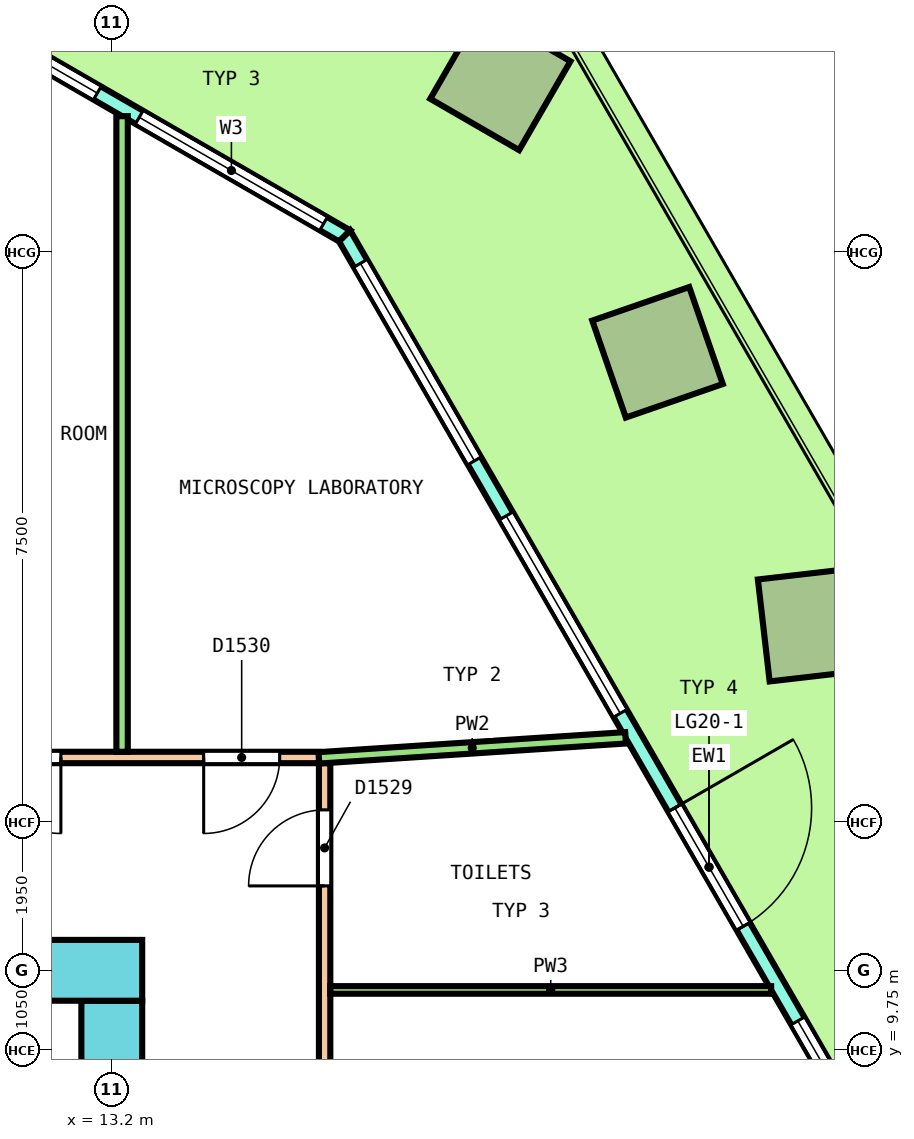
"""IFC4 building model, lengths in metres.
Left out: names, types, materials, properties, quantities, classifications, styles, units other than length and angle.
Written with IfcOpenShell. Run it as: python <this file> out.ifc"""

import sys

from ifc_helpers import new_model, si_unit, direction, frame, frame_2d, origin, origin_2d, place, context, subcontext, project, spatial, polyline, rectangle, outline, extrude, element, fill, save


model = new_model("IFC4")
c1 = context("Model", 3, precision=1e-05, world=origin(), true_north=direction((0.0, 1.0)))
c2 = subcontext(c1, "Body", "Model", "MODEL_VIEW")
j1 = project(units=[si_unit("LENGTHUNIT", "METRE"), si_unit("PLANEANGLEUNIT", "RADIAN")], contexts=[c1])
p1 = place(None, origin())
s1 = spatial("IfcSite", under=j1, at=p1, CompositionType="ELEMENT")
p2 = place(p1, origin())
s2 = spatial("IfcBuilding", under=s1, at=p2, CompositionType="ELEMENT")
p3 = place(p2, frame((0.0, 0.0, 94.0)))
s3 = spatial("IfcBuildingStorey", under=s2, at=p3, CompositionType="ELEMENT", Elevation=94.0)
p4 = place(p3, frame((22.448, 15.348, 0.0), z_axis=(0.029040838643, 0.012592396839, 0.999498905068), x_axis=(-0.500309041058, 0.865839303482, 0.003628220107)))
e1 = element("IfcColumn", 1, at=p4, inside=s3, PredefinedType="COLUMN", context=c2, shape_type="SweptSolid", body=[
    extrude(rectangle(XDim=1.35, YDim=1.35, at=origin_2d()), origin(), (0.0, 0.0, 1.0), 4.052),
])
p5 = place(p3, frame((20.38, 18.93, 0.0), z_axis=(0.032654187208, 0.006265748099, 0.999447069363), x_axis=(-0.498938011444, 0.86656951925, 0.010868718561)))
e2 = element("IfcColumn", 2, at=p5, inside=s3, PredefinedType="COLUMN", context=c2, shape_type="SweptSolid", body=[
    extrude(rectangle(XDim=1.35, YDim=1.35, at=origin_2d()), origin(), (0.0, 0.0, 1.0), 4.052),
])
p6 = place(p3, frame((18.312, 22.512, 0.0), z_axis=(0.036265236264, 0.0, 0.999342199969), x_axis=(-0.865313546461, 0.500246354177, 0.031401456084)))
e3 = element("IfcColumn", 3, at=p6, inside=s3, PredefinedType="COLUMN", context=c2, shape_type="SweptSolid", body=[
    extrude(rectangle(XDim=1.35, YDim=1.35, at=origin_2d()), origin(), (0.0, 0.0, 1.0), 4.053),
])
p7 = place(p3, frame((25.852, 3.852, 0.0), z_axis=(0.0, 0.0, 1.0), x_axis=(-0.499998279088, 0.866026397351, 0.0)))
e4 = element("IfcWall", 4, at=p7, inside=s3, PredefinedType="SOLIDWALL", context=c2, shape_type="SweptSolid", body=[
    extrude(outline(polyline([(-0.027, -0.1), (0.985, -0.1), (1.998, -0.1), (3.01, -0.1), (4.022, -0.1), (5.035, -0.1), (6.047, -0.1), (7.059, -0.1), (8.072, -0.1), (9.084, -0.1), (10.096, -0.1), (11.109, -0.1), (12.121, -0.1), (13.133, -0.1), (14.146, -0.1), (15.158, -0.1), (16.17, -0.1), (17.182, -0.1), (18.195, -0.1), (19.207, -0.1), (19.153, 0.1), (18.147, 0.1), (17.14, 0.1), (16.133, 0.1), (15.127, 0.1), (14.12, 0.1), (13.113, 0.1), (12.107, 0.1), (11.1, 0.1), (10.094, 0.1), (9.087, 0.1), (8.08, 0.1), (7.073, 0.1), (6.067, 0.1), (5.06, 0.1), (4.053, 0.1), (3.047, 0.1), (2.04, 0.1), (1.033, 0.1), (0.027, 0.1), (-0.027, -0.1)])), origin(), (0.0, 0.0, 1.0), 4.1),
])
p8 = place(p7, frame((0.418, 0.0, 0.1)))
e5 = element("IfcOpeningElement", 5, at=p8, cuts=e4, PredefinedType="OPENING", context=c2, shape_type="SweptSolid", body=[
    extrude(rectangle(XDim=3.0, YDim=2.9, at=frame_2d((1.5, 1.45))), frame((0.0, 0.11, 0.0), z_axis=(0.0, -1.0, 0.0), x_axis=(1.0, 0.0, 0.0)), (0.0, 0.0, 1.0), 0.22),
])
p9 = place(p7, frame((4.254, 0.0, 0.1)))
e6 = element("IfcOpeningElement", 6, at=p9, cuts=e4, PredefinedType="OPENING", context=c2, shape_type="SweptSolid", body=[
    extrude(rectangle(XDim=3.0, YDim=2.9, at=frame_2d((1.5, 1.45))), frame((0.0, 0.11, 0.0), z_axis=(0.0, -1.0, 0.0), x_axis=(1.0, 0.0, 0.0)), (0.0, 0.0, 1.0), 0.22),
])
p10 = place(p7, frame((8.69, 0.0, 0.0)))
e7 = element("IfcOpeningElement", 7, at=p10, cuts=e4, PredefinedType="OPENING", context=c2, shape_type="SweptSolid", body=[
    extrude(rectangle(XDim=1.8, YDim=2.4, at=frame_2d((0.9, 1.2))), frame((0.0, 0.11, 0.0), z_axis=(0.0, -1.0, 0.0), x_axis=(1.0, 0.0, 0.0)), (0.0, 0.0, 1.0), 0.22),
])
p11 = place(p7, frame((8.69, 0.0, 2.55)))
e8 = element("IfcOpeningElement", 8, at=p11, cuts=e4, PredefinedType="OPENING", context=c2, shape_type="SweptSolid", body=[
    extrude(rectangle(XDim=1.8, YDim=0.45, at=frame_2d((0.9, 0.225))), frame((0.0, 0.11, 0.0), z_axis=(0.0, -1.0, 0.0), x_axis=(1.0, 0.0, 0.0)), (0.0, 0.0, 1.0), 0.22),
])
p12 = place(p7, frame((11.926, 0.0, 0.1)))
e9 = element("IfcOpeningElement", 9, at=p12, cuts=e4, PredefinedType="OPENING", context=c2, shape_type="SweptSolid", body=[
    extrude(rectangle(XDim=3.0, YDim=2.9, at=frame_2d((1.5, 1.45))), frame((0.0, 0.11, 0.0), z_axis=(0.0, -1.0, 0.0), x_axis=(1.0, 0.0, 0.0)), (0.0, 0.0, 1.0), 0.22),
])
p13 = place(p7, frame((15.762, 0.0, 0.1)))
e10 = element("IfcOpeningElement", 10, at=p13, cuts=e4, PredefinedType="OPENING", context=c2, shape_type="SweptSolid", body=[
    extrude(rectangle(XDim=3.0, YDim=2.9, at=frame_2d((1.5, 1.45))), frame((0.0, 0.11, 0.0), z_axis=(0.0, -1.0, 0.0), x_axis=(1.0, 0.0, 0.0)), (0.0, 0.0, 1.0), 0.22),
])
p14 = place(p3, frame((16.262, 20.463, 0.0), z_axis=(0.0, 0.0, 1.0), x_axis=(-0.866029458321, 0.49999297727, 0.0)))
e11 = element("IfcWall", 11, at=p14, inside=s3, PredefinedType="SOLIDWALL", context=c2, shape_type="SweptSolid", body=[
    extrude(outline(polyline([(-0.027, -0.1), (1.128, -0.1), (2.282, -0.1), (3.437, -0.1), (4.592, -0.1), (5.747, -0.1), (6.901, -0.1), (6.848, 0.1), (5.711, 0.1), (4.574, 0.1), (3.437, 0.1), (2.301, 0.1), (1.164, 0.1), (0.027, 0.1), (-0.027, -0.1)])), origin(), (0.0, 0.0, 1.0), 4.1),
])
p15 = place(p14, frame((0.319, 0.0, 0.1)))
e12 = element("IfcOpeningElement", 12, at=p15, cuts=e11, PredefinedType="OPENING", context=c2, shape_type="SweptSolid", body=[
    extrude(rectangle(XDim=2.8, YDim=2.9, at=frame_2d((1.4, 1.45))), frame((0.0, 0.11, 0.0), z_axis=(0.0, -1.0, 0.0), x_axis=(1.0, 0.0, 0.0)), (0.0, 0.0, 1.0), 0.22),
])
p16 = place(p14, frame((3.756, 0.0, 0.1)))
e13 = element("IfcOpeningElement", 13, at=p16, cuts=e11, PredefinedType="OPENING", context=c2, shape_type="SweptSolid", body=[
    extrude(rectangle(XDim=2.8, YDim=2.9, at=frame_2d((1.4, 1.45))), frame((0.0, 0.11, 0.0), z_axis=(0.0, -1.0, 0.0), x_axis=(1.0, 0.0, 0.0)), (0.0, 0.0, 1.0), 0.22),
])
p17 = place(p3, frame((-13.6, 10.8, 0.0), z_axis=(0.0, 0.0, 1.0), x_axis=(1.0, 0.0, 0.0)))
e14 = element("IfcWall", 14, at=p17, inside=s3, PredefinedType="SHEAR", context=c2, shape_type="SweptSolid", body=[
    extrude(rectangle(XDim=27.2, YDim=0.8, at=frame_2d((13.6, 0.0))), origin(), (0.0, 0.0, 1.0), 4.1),
])
p18 = place(p17, frame((1.798, 0.0, 0.0)))
e15 = element("IfcOpeningElement", 15, at=p18, cuts=e14, PredefinedType="OPENING", context=c2, shape_type="SweptSolid", body=[
    extrude(rectangle(XDim=1.0, YDim=2.1, at=frame_2d((0.5, 1.05))), frame((0.0, 0.41, 0.0), z_axis=(0.0, -1.0, 0.0), x_axis=(1.0, 0.0, 0.0)), (0.0, 0.0, 1.0), 0.82),
])
p19 = place(p17, frame((4.889, 0.0, 0.0)))
e16 = element("IfcOpeningElement", 16, at=p19, cuts=e14, PredefinedType="OPENING", context=c2, shape_type="SweptSolid", body=[
    extrude(rectangle(XDim=1.0, YDim=2.1, at=frame_2d((0.5, 1.05))), frame((0.0, 0.41, 0.0), z_axis=(0.0, -1.0, 0.0), x_axis=(1.0, 0.0, 0.0)), (0.0, 0.0, 1.0), 0.82),
])
p20 = place(p17, frame((7.948, 0.0, 0.0)))
e17 = element("IfcOpeningElement", 17, at=p20, cuts=e14, PredefinedType="OPENING", context=c2, shape_type="SweptSolid", body=[
    extrude(rectangle(XDim=1.0, YDim=2.1, at=frame_2d((0.5, 1.05))), frame((0.0, 0.41, 0.0), z_axis=(0.0, -1.0, 0.0), x_axis=(1.0, 0.0, 0.0)), (0.0, 0.0, 1.0), 0.82),
])
p21 = place(p17, frame((11.008, 0.0, 0.0)))
e18 = element("IfcOpeningElement", 18, at=p21, cuts=e14, PredefinedType="OPENING", context=c2, shape_type="SweptSolid", body=[
    extrude(rectangle(XDim=1.0, YDim=2.1, at=frame_2d((0.5, 1.05))), frame((0.0, 0.41, 0.0), z_axis=(0.0, -1.0, 0.0), x_axis=(1.0, 0.0, 0.0)), (0.0, 0.0, 1.0), 0.82),
])
p22 = place(p17, frame((18.035, 0.0, 0.0)))
e19 = element("IfcOpeningElement", 19, at=p22, cuts=e14, PredefinedType="OPENING", context=c2, shape_type="SweptSolid", body=[
    extrude(rectangle(XDim=1.0, YDim=2.1, at=frame_2d((0.5, 1.05))), frame((0.0, 0.41, 0.0), z_axis=(0.0, -1.0, 0.0), x_axis=(1.0, 0.0, 0.0)), (0.0, 0.0, 1.0), 0.82),
])
p23 = place(p17, frame((21.181, 0.0, 0.0)))
e20 = element("IfcOpeningElement", 20, at=p23, cuts=e14, PredefinedType="OPENING", context=c2, shape_type="SweptSolid", body=[
    extrude(rectangle(XDim=1.0, YDim=2.1, at=frame_2d((0.5, 1.05))), frame((0.0, 0.41, 0.0), z_axis=(0.0, -1.0, 0.0), x_axis=(1.0, 0.0, 0.0)), (0.0, 0.0, 1.0), 0.82),
])
p24 = place(p17, frame((24.358, 0.0, 0.0)))
e21 = element("IfcOpeningElement", 21, at=p24, cuts=e14, PredefinedType="OPENING", context=c2, shape_type="SweptSolid", body=[
    extrude(rectangle(XDim=1.0, YDim=2.1, at=frame_2d((0.5, 1.05))), frame((0.0, 0.41, 0.0), z_axis=(0.0, -1.0, 0.0), x_axis=(1.0, 0.0, 0.0)), (0.0, 0.0, 1.0), 0.82),
])
p25 = place(p17, frame((14.525, 0.0, 0.0)))
e22 = element("IfcOpeningElement", 22, at=p25, cuts=e14, PredefinedType="OPENING", context=c2, shape_type="SweptSolid", body=[
    extrude(rectangle(XDim=1.4, YDim=2.1, at=frame_2d((0.7, 1.05))), frame((0.0, 0.41, 0.0), z_axis=(0.0, -1.0, 0.0), x_axis=(1.0, 0.0, 0.0)), (0.0, 0.0, 1.0), 0.82),
])
p26 = place(p3, frame((13.2, -10.4, 0.0), z_axis=(0.0, 0.0, 1.0), x_axis=(0.0, 1.0, 0.0)))
e23 = element("IfcWall", 23, at=p26, inside=s3, PredefinedType="SHEAR", context=c2, shape_type="SweptSolid", body=[
    extrude(rectangle(XDim=20.8, YDim=0.8, at=frame_2d((10.4, 0.0))), origin(), (0.0, 0.0, 1.0), 4.1),
])
p27 = place(p26, frame((9.2, 0.0, 0.0)))
e24 = element("IfcOpeningElement", 24, at=p27, cuts=e23, PredefinedType="OPENING", context=c2, shape_type="SweptSolid", body=[
    extrude(rectangle(XDim=2.4, YDim=2.1, at=frame_2d((1.2, 1.05))), frame((0.0, 0.41, 0.0), z_axis=(0.0, -1.0, 0.0), x_axis=(1.0, 0.0, 0.0)), (0.0, 0.0, 1.0), 0.82),
])
p28 = place(p26, frame((16.1, 0.0, 0.0)))
e25 = element("IfcOpeningElement", 25, at=p28, cuts=e23, PredefinedType="OPENING", context=c2, shape_type="SweptSolid", body=[
    extrude(rectangle(XDim=1.2, YDim=2.1, at=frame_2d((0.6, 1.05))), frame((0.0, 0.41, 0.0), z_axis=(0.0, -1.0, 0.0), x_axis=(1.0, 0.0, 0.0)), (0.0, 0.0, 1.0), 0.82),
])
p29 = place(p26, frame((3.6, 0.0, 0.0)))
e26 = element("IfcOpeningElement", 26, at=p29, cuts=e23, PredefinedType="OPENING", context=c2, shape_type="SweptSolid", body=[
    extrude(rectangle(XDim=1.0, YDim=2.1, at=frame_2d((0.5, 1.05))), frame((0.0, 0.41, 0.0), z_axis=(0.0, -1.0, 0.0), x_axis=(1.0, 0.0, 0.0)), (0.0, 0.0, 1.0), 0.82),
])
p30 = place(p3, frame((16.0, -13.525, 0.0), z_axis=(0.0, 0.0, 1.0), x_axis=(0.0, 1.0, 0.0)))
e27 = element("IfcWall", 27, at=p30, inside=s3, PredefinedType="PARTITIONING", context=c2, shape_type="SweptSolid", body=[
    extrude(rectangle(XDim=27.05, YDim=0.15, at=frame_2d((13.525, 0.0))), origin(), (0.0, 0.0, 1.0), 3.05),
])
p31 = place(p30, frame((18.403, 0.0, 0.0)))
e28 = element("IfcOpeningElement", 28, at=p31, cuts=e27, PredefinedType="OPENING", context=c2, shape_type="SweptSolid", body=[
    extrude(rectangle(XDim=1.2, YDim=2.1, at=frame_2d((0.6, 1.05))), frame((0.0, 0.085, 0.0), z_axis=(0.0, -1.0, 0.0), x_axis=(1.0, 0.0, 0.0)), (0.0, 0.0, 1.0), 0.17),
])
p32 = place(p30, frame((25.435, 0.0, 0.0)))
e29 = element("IfcOpeningElement", 29, at=p32, cuts=e27, PredefinedType="OPENING", context=c2, shape_type="SweptSolid", body=[
    extrude(rectangle(XDim=1.0, YDim=2.1, at=frame_2d((0.5, 1.05))), frame((0.0, 0.085, 0.0), z_axis=(0.0, -1.0, 0.0), x_axis=(1.0, 0.0, 0.0)), (0.0, 0.0, 1.0), 0.17),
])
p33 = place(p30, frame((1.542, 0.0, 0.0)))
e30 = element("IfcOpeningElement", 30, at=p33, cuts=e27, PredefinedType="OPENING", context=c2, shape_type="SweptSolid", body=[
    extrude(rectangle(XDim=1.0, YDim=2.1, at=frame_2d((0.5, 1.05))), frame((0.0, 0.085, 0.0), z_axis=(0.0, -1.0, 0.0), x_axis=(1.0, 0.0, 0.0)), (0.0, 0.0, 1.0), 0.17),
])
p34 = place(p30, frame((4.605, 0.0, 0.0)))
e31 = element("IfcOpeningElement", 31, at=p34, cuts=e27, PredefinedType="OPENING", context=c2, shape_type="SweptSolid", body=[
    extrude(rectangle(XDim=1.0, YDim=2.1, at=frame_2d((0.5, 1.05))), frame((0.0, 0.085, 0.0), z_axis=(0.0, -1.0, 0.0), x_axis=(1.0, 0.0, 0.0)), (0.0, 0.0, 1.0), 0.17),
])
p35 = place(p30, frame((7.904, 0.0, 0.0)))
e32 = element("IfcOpeningElement", 32, at=p35, cuts=e27, PredefinedType="OPENING", context=c2, shape_type="SweptSolid", body=[
    extrude(rectangle(XDim=1.0, YDim=2.1, at=frame_2d((0.5, 1.05))), frame((0.0, 0.085, 0.0), z_axis=(0.0, -1.0, 0.0), x_axis=(1.0, 0.0, 0.0)), (0.0, 0.0, 1.0), 0.17),
])
p36 = place(p30, frame((11.267, 0.0, 0.0)))
e33 = element("IfcOpeningElement", 33, at=p36, cuts=e27, PredefinedType="OPENING", context=c2, shape_type="SweptSolid", body=[
    extrude(rectangle(XDim=1.0, YDim=2.1, at=frame_2d((0.5, 1.05))), frame((0.0, 0.085, 0.0), z_axis=(0.0, -1.0, 0.0), x_axis=(1.0, 0.0, 0.0)), (0.0, 0.0, 1.0), 0.17),
])
p37 = place(p3, frame((-15.925, 13.6, 0.0), z_axis=(0.0, 0.0, 1.0), x_axis=(1.0, 0.0, 0.0)))
e34 = element("IfcWall", 34, at=p37, inside=s3, PredefinedType="PARTITIONING", context=c2, shape_type="SweptSolid", body=[
    extrude(rectangle(XDim=31.85, YDim=0.15, at=frame_2d((15.925, 0.0))), origin(), (0.0, 0.0, 1.0), 3.05),
])
p38 = place(p37, frame((30.334, 0.0, 0.0)))
e35 = element("IfcOpeningElement", 35, at=p38, cuts=e34, PredefinedType="OPENING", context=c2, shape_type="SweptSolid", body=[
    extrude(rectangle(XDim=1.0, YDim=2.1, at=frame_2d((0.5, 1.05))), frame((0.0, 0.085, 0.0), z_axis=(0.0, -1.0, 0.0), x_axis=(1.0, 0.0, 0.0)), (0.0, 0.0, 1.0), 0.17),
])
p39 = place(p37, frame((27.455, 0.0, 0.0)))
e36 = element("IfcOpeningElement", 36, at=p39, cuts=e34, PredefinedType="OPENING", context=c2, shape_type="SweptSolid", body=[
    extrude(rectangle(XDim=1.0, YDim=2.1, at=frame_2d((0.5, 1.05))), frame((0.0, 0.085, 0.0), z_axis=(0.0, -1.0, 0.0), x_axis=(1.0, 0.0, 0.0)), (0.0, 0.0, 1.0), 0.17),
])
p40 = place(p37, frame((16.833, 0.0, 0.0)))
e37 = element("IfcOpeningElement", 37, at=p40, cuts=e34, PredefinedType="OPENING", context=c2, shape_type="SweptSolid", body=[
    extrude(rectangle(XDim=1.2, YDim=2.1, at=frame_2d((0.6, 1.05))), frame((0.0, 0.085, 0.0), z_axis=(0.0, -1.0, 0.0), x_axis=(1.0, 0.0, 0.0)), (0.0, 0.0, 1.0), 0.17),
])
p41 = place(p37, frame((10.866, 0.0, 0.0)))
e38 = element("IfcOpeningElement", 38, at=p41, cuts=e34, PredefinedType="OPENING", context=c2, shape_type="SweptSolid", body=[
    extrude(rectangle(XDim=1.0, YDim=2.1, at=frame_2d((0.5, 1.05))), frame((0.0, 0.085, 0.0), z_axis=(0.0, -1.0, 0.0), x_axis=(1.0, 0.0, 0.0)), (0.0, 0.0, 1.0), 0.17),
])
p42 = place(p37, frame((3.395, 0.0, 0.0)))
e39 = element("IfcOpeningElement", 39, at=p42, cuts=e34, PredefinedType="OPENING", context=c2, shape_type="SweptSolid", body=[
    extrude(rectangle(XDim=1.0, YDim=2.1, at=frame_2d((0.5, 1.05))), frame((0.0, 0.085, 0.0), z_axis=(0.0, -1.0, 0.0), x_axis=(1.0, 0.0, 0.0)), (0.0, 0.0, 1.0), 0.17),
])
p43 = place(p37, frame((0.998, 0.0, 0.0)))
e40 = element("IfcOpeningElement", 40, at=p43, cuts=e34, PredefinedType="OPENING", context=c2, shape_type="SweptSolid", body=[
    extrude(rectangle(XDim=1.0, YDim=2.1, at=frame_2d((0.5, 1.05))), frame((0.0, 0.085, 0.0), z_axis=(0.0, -1.0, 0.0), x_axis=(1.0, 0.0, 0.0)), (0.0, 0.0, 1.0), 0.17),
])
p44 = place(p3, frame((15.925, 13.595, 0.0), z_axis=(0.0, 0.0, 1.0), x_axis=(0.997875073205, 0.065156260453, 0.0)))
e41 = element("IfcWall", 41, at=p44, inside=s3, PredefinedType="PARTITIONING", context=c2, shape_type="SweptSolid", body=[
    extrude(rectangle(XDim=4.043, YDim=0.15, at=frame_2d((2.021, 0.0))), origin(), (0.0, 0.0, 1.0), 3.05),
])
p45 = place(p3, frame((13.335, 13.675, 0.0), z_axis=(0.0, 0.0, 1.0), x_axis=(0.0, 1.0, 0.0)))
e42 = element("IfcWall", 42, at=p45, inside=s3, PredefinedType="PARTITIONING", context=c2, shape_type="SweptSolid", body=[
    extrude(rectangle(XDim=8.362, YDim=0.15, at=frame_2d((4.181, 0.0))), origin(), (0.0, 0.0, 1.0), 3.05),
])
p46 = place(p3, frame((16.075, 10.542, 0.0), z_axis=(0.0, 0.0, 1.0), x_axis=(1.0, 0.0, 0.0)))
e43 = element("IfcWall", 43, at=p46, inside=s3, PredefinedType="PARTITIONING", context=c2, shape_type="SweptSolid", body=[
    extrude(rectangle(XDim=5.8, YDim=0.1, at=frame_2d((2.9, 0.0))), origin(), (0.0, 0.0, 1.0), 3.05),
])
p47 = place(p9, origin())
e44 = element("IfcWindow", 44, at=p47, inside=s3, PartitioningType="SINGLE_PANEL", PredefinedType="WINDOW", context=c2, shape_type="SweptSolid", body=[
    extrude(rectangle(XDim=3.0, YDim=2.9, at=frame_2d((1.5, 1.45))), frame((0.0, 0.03, 0.0), z_axis=(0.0, -1.0, 0.0), x_axis=(1.0, 0.0, 0.0)), (0.0, 0.0, 1.0), 0.06),
])
fill(e6, e44)
p48 = place(p10, origin())
e45 = element("IfcDoor", 45, at=p48, inside=s3, OperationType="DOUBLE_DOOR_SINGLE_SWING", PredefinedType="DOOR", context=c2, shape_type="SweptSolid", body=[
    extrude(rectangle(XDim=1.8, YDim=2.4, at=frame_2d((0.9, 1.2))), frame((0.0, 0.025, 0.0), z_axis=(0.0, -1.0, 0.0), x_axis=(1.0, 0.0, 0.0)), (0.0, 0.0, 1.0), 0.05),
])
fill(e7, e45)
p49 = place(p11, origin())
e46 = element("IfcWindow", 46, at=p49, inside=s3, PartitioningType="SINGLE_PANEL", PredefinedType="WINDOW", context=c2, shape_type="SweptSolid", body=[
    extrude(rectangle(XDim=1.8, YDim=0.45, at=frame_2d((0.9, 0.225))), frame((0.0, 0.03, 0.0), z_axis=(0.0, -1.0, 0.0), x_axis=(1.0, 0.0, 0.0)), (0.0, 0.0, 1.0), 0.06),
])
fill(e8, e46)
p50 = place(p12, origin())
e47 = element("IfcWindow", 47, at=p50, inside=s3, PartitioningType="SINGLE_PANEL", PredefinedType="WINDOW", context=c2, shape_type="SweptSolid", body=[
    extrude(rectangle(XDim=3.0, YDim=2.9, at=frame_2d((1.5, 1.45))), frame((0.0, 0.03, 0.0), z_axis=(0.0, -1.0, 0.0), x_axis=(1.0, 0.0, 0.0)), (0.0, 0.0, 1.0), 0.06),
])
fill(e9, e47)
p51 = place(p13, origin())
e48 = element("IfcWindow", 48, at=p51, inside=s3, PartitioningType="SINGLE_PANEL", PredefinedType="WINDOW", context=c2, shape_type="SweptSolid", body=[
    extrude(rectangle(XDim=3.0, YDim=2.9, at=frame_2d((1.5, 1.45))), frame((0.0, 0.03, 0.0), z_axis=(0.0, -1.0, 0.0), x_axis=(1.0, 0.0, 0.0)), (0.0, 0.0, 1.0), 0.06),
])
fill(e10, e48)
p52 = place(p15, origin())
e49 = element("IfcWindow", 49, at=p52, inside=s3, PartitioningType="SINGLE_PANEL", PredefinedType="WINDOW", context=c2, shape_type="SweptSolid", body=[
    extrude(rectangle(XDim=2.8, YDim=2.9, at=frame_2d((1.4, 1.45))), frame((0.0, 0.03, 0.0), z_axis=(0.0, -1.0, 0.0), x_axis=(1.0, 0.0, 0.0)), (0.0, 0.0, 1.0), 0.06),
])
fill(e12, e49)
p53 = place(p16, origin())
e50 = element("IfcWindow", 50, at=p53, inside=s3, PartitioningType="SINGLE_PANEL", PredefinedType="WINDOW", context=c2, shape_type="SweptSolid", body=[
    extrude(rectangle(XDim=2.8, YDim=2.9, at=frame_2d((1.4, 1.45))), frame((0.0, 0.03, 0.0), z_axis=(0.0, -1.0, 0.0), x_axis=(1.0, 0.0, 0.0)), (0.0, 0.0, 1.0), 0.06),
])
fill(e13, e50)
p54 = place(p32, origin())
e51 = element("IfcDoor", 51, at=p54, inside=s3, OperationType="SINGLE_SWING_LEFT", PredefinedType="DOOR", context=c2, shape_type="SweptSolid", body=[
    extrude(rectangle(XDim=1.0, YDim=2.1, at=frame_2d((0.5, 1.05))), frame((0.0, 0.025, 0.0), z_axis=(0.0, -1.0, 0.0), x_axis=(1.0, 0.0, 0.0)), (0.0, 0.0, 1.0), 0.05),
])
fill(e29, e51)
p55 = place(p38, origin())
e52 = element("IfcDoor", 52, at=p55, inside=s3, OperationType="SINGLE_SWING_LEFT", PredefinedType="DOOR", context=c2, shape_type="SweptSolid", body=[
    extrude(rectangle(XDim=1.0, YDim=2.1, at=frame_2d((0.5, 1.05))), frame((0.0, 0.025, 0.0), z_axis=(0.0, -1.0, 0.0), x_axis=(1.0, 0.0, 0.0)), (0.0, 0.0, 1.0), 0.05),
])
fill(e35, e52)
p56 = place(p39, origin())
e53 = element("IfcDoor", 53, at=p56, inside=s3, OperationType="SINGLE_SWING_RIGHT", PredefinedType="DOOR", context=c2, shape_type="SweptSolid", body=[
    extrude(rectangle(XDim=1.0, YDim=2.1, at=frame_2d((0.5, 1.05))), frame((0.0, 0.025, 0.0), z_axis=(0.0, -1.0, 0.0), x_axis=(1.0, 0.0, 0.0)), (0.0, 0.0, 1.0), 0.05),
])
fill(e36, e53)
save(model, sys.argv[1])
